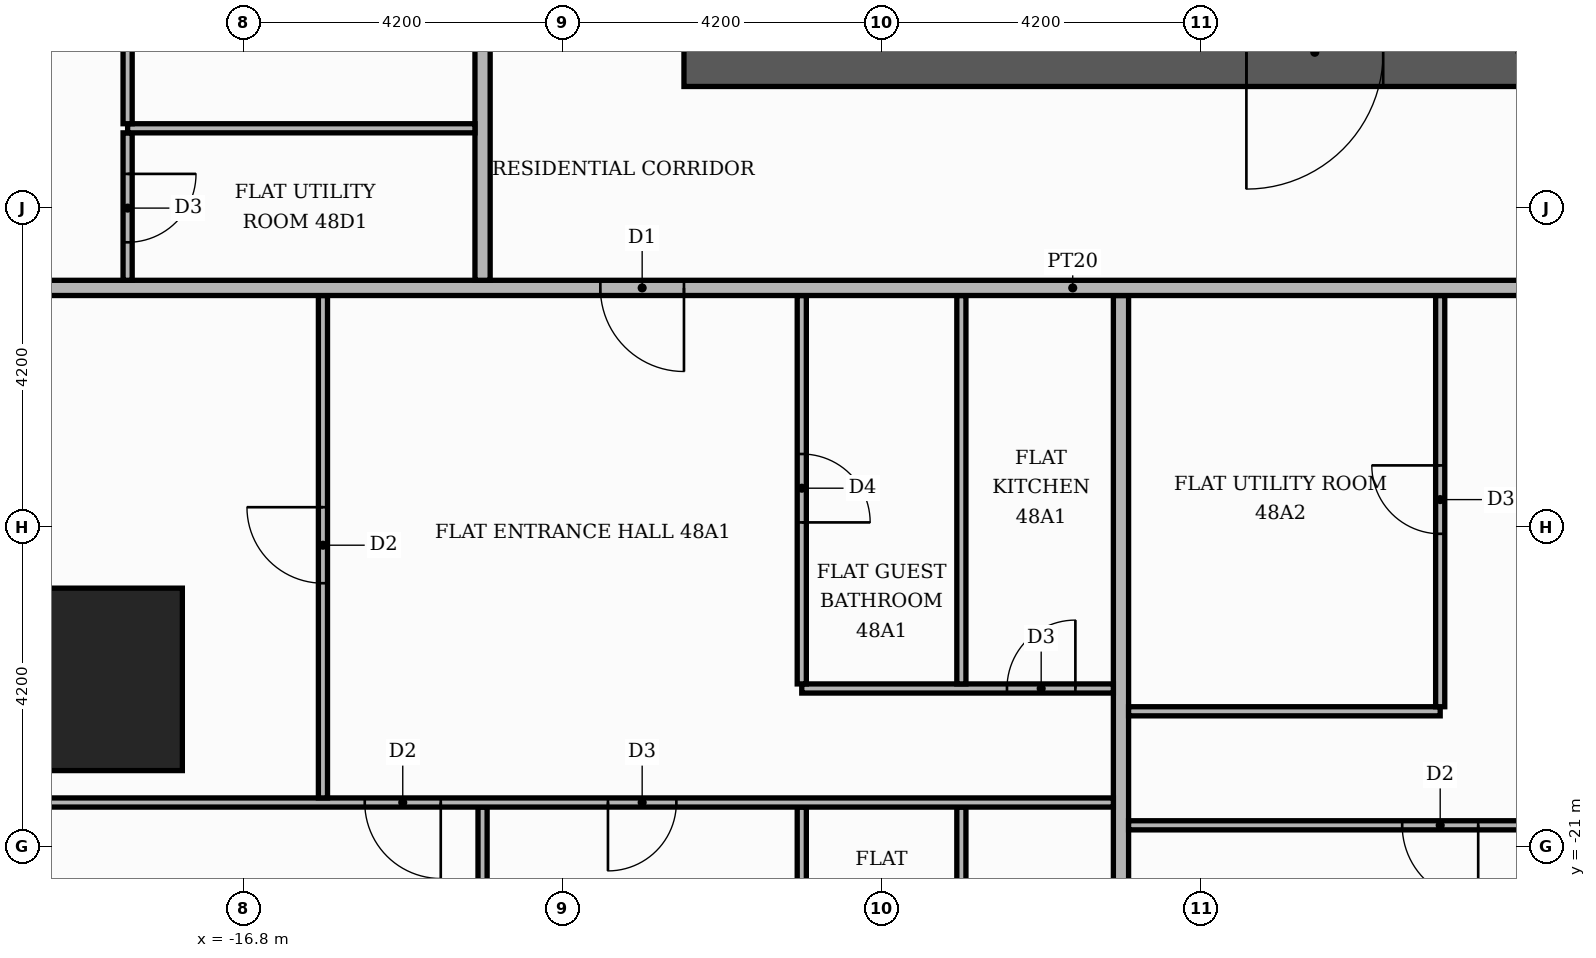
"""IFC4 building model, lengths in metres.
Left out: names, types, materials, properties, quantities, classifications, styles, units other than length and angle.
Written with IfcOpenShell. Run it as: python <this file> out.ifc"""

import sys

from ifc_helpers import new_model, si_unit, direction, frame, frame_2d, origin, origin_2d, place, context, subcontext, project, spatial, rectangle, extrude, element, fill, save


model = new_model("IFC4")
c1 = context("Model", 3, precision=1e-05, world=origin(), true_north=direction((0.0, 1.0)))
c2 = subcontext(c1, "Body", "Model", "MODEL_VIEW")
j1 = project(units=[si_unit("LENGTHUNIT", "METRE"), si_unit("PLANEANGLEUNIT", "RADIAN")], contexts=[c1])
p1 = place(None, origin())
s1 = spatial("IfcSite", under=j1, at=p1, CompositionType="ELEMENT")
p2 = place(p1, origin())
s2 = spatial("IfcBuilding", under=s1, at=p2, CompositionType="ELEMENT")
p3 = place(p2, frame((0.0, 0.0, 204.0)))
s3 = spatial("IfcBuildingStorey", under=s2, at=p3, CompositionType="ELEMENT", Elevation=204.0)
p4 = place(p3, frame((-11.0, -10.55, 0.0), z_axis=(0.0, 0.0, 1.0), x_axis=(1.0, 0.0, 0.0)))
e1 = element("IfcWall", 1, at=p4, inside=s3, PredefinedType="SHEAR", context=c2, shape_type="SweptSolid", body=[
    extrude(rectangle(XDim=22.0, YDim=0.9, at=frame_2d((11.0, 0.0))), origin(), (0.0, 0.0, 1.0), 3.48),
])
p5 = place(p4, frame((7.4, 0.0, 0.0)))
e2 = element("IfcOpeningElement", 2, at=p5, cuts=e1, PredefinedType="OPENING", context=c2, shape_type="SweptSolid", body=[
    extrude(rectangle(XDim=1.8, YDim=2.2, at=frame_2d((0.9, 1.1))), frame((0.0, 0.46, 0.0), z_axis=(0.0, -1.0, 0.0), x_axis=(1.0, 0.0, 0.0)), (0.0, 0.0, 1.0), 0.92),
])
p6 = place(p3, frame((-18.8, -18.8, 0.0), z_axis=(0.0, 0.0, 1.0), x_axis=(1.0, 0.0, 0.0)))
e3 = element("IfcColumn", 3, at=p6, inside=s3, PredefinedType="COLUMN", context=c2, shape_type="SweptSolid", body=[
    extrude(rectangle(XDim=2.4, YDim=2.4, at=origin_2d()), origin(), (0.0, 0.0, 1.0), 3.9),
])
p7 = place(p3, frame((-13.65, -25.42, 0.0), z_axis=(0.0, 0.0, 1.0), x_axis=(0.0, 1.0, 0.0)))
e4 = element("IfcWall", 4, at=p7, inside=s3, PredefinedType="PARTITIONING", context=c2, shape_type="SweptSolid", body=[
    extrude(rectangle(XDim=4.94, YDim=0.12, at=frame_2d((2.47, 0.0))), origin(), (0.0, 0.0, 1.0), 3.48),
])
p8 = place(p3, frame((-9.45, -25.42, 0.0), z_axis=(0.0, 0.0, 1.0), x_axis=(0.0, 1.0, 0.0)))
e5 = element("IfcWall", 5, at=p8, inside=s3, PredefinedType="PARTITIONING", context=c2, shape_type="SweptSolid", body=[
    extrude(rectangle(XDim=4.94, YDim=0.12, at=frame_2d((2.47, 0.0))), origin(), (0.0, 0.0, 1.0), 3.48),
])
p9 = place(p8, frame((1.9, 0.0, 0.0)))
e6 = element("IfcOpeningElement", 6, at=p9, cuts=e5, PredefinedType="OPENING", context=c2, shape_type="SweptSolid", body=[
    extrude(rectangle(XDim=0.9, YDim=2.1, at=frame_2d((0.45, 1.05))), frame((0.0, 0.07, 0.0), z_axis=(0.0, -1.0, 0.0), x_axis=(1.0, 0.0, 0.0)), (0.0, 0.0, 1.0), 0.14),
])
p10 = place(p3, frame((-7.35, -25.42, 0.0), z_axis=(0.0, 0.0, 1.0), x_axis=(0.0, 1.0, 0.0)))
e7 = element("IfcWall", 7, at=p10, inside=s3, PredefinedType="PARTITIONING", context=c2, shape_type="SweptSolid", body=[
    extrude(rectangle(XDim=4.94, YDim=0.12, at=frame_2d((2.47, 0.0))), origin(), (0.0, 0.0, 1.0), 3.48),
])
p11 = place(p10, frame((1.9, 0.0, 0.0)))
e8 = element("IfcOpeningElement", 8, at=p11, cuts=e7, PredefinedType="OPENING", context=c2, shape_type="SweptSolid", body=[
    extrude(rectangle(XDim=0.9, YDim=2.1, at=frame_2d((0.45, 1.05))), frame((0.0, 0.07, 0.0), z_axis=(0.0, -1.0, 0.0), x_axis=(1.0, 0.0, 0.0)), (0.0, 0.0, 1.0), 0.14),
])
p12 = place(p3, frame((-5.25, -25.42, 0.0), z_axis=(0.0, 0.0, 1.0), x_axis=(0.0, 1.0, 0.0)))
e9 = element("IfcWall", 9, at=p12, inside=s3, PredefinedType="PARTITIONING", context=c2, shape_type="SweptSolid", body=[
    extrude(rectangle(XDim=11.67, YDim=0.2, at=frame_2d((5.835, 0.0))), origin(), (0.0, 0.0, 1.0), 3.48),
])
p13 = place(p3, frame((-5.15, -20.72, 0.0), z_axis=(0.0, 0.0, 1.0), x_axis=(1.0, 0.0, 0.0)))
e10 = element("IfcWall", 10, at=p13, inside=s3, PredefinedType="PARTITIONING", context=c2, shape_type="SweptSolid", body=[
    extrude(rectangle(XDim=18.7, YDim=0.12, at=frame_2d((9.35, 0.0))), origin(), (0.0, 0.0, 1.0), 3.48),
])
p14 = place(p13, frame((3.6, 0.0, 0.0)))
e11 = element("IfcOpeningElement", 11, at=p14, cuts=e10, PredefinedType="OPENING", context=c2, shape_type="SweptSolid", body=[
    extrude(rectangle(XDim=1.0, YDim=2.1, at=frame_2d((0.5, 1.05))), frame((0.0, 0.07, 0.0), z_axis=(0.0, -1.0, 0.0), x_axis=(1.0, 0.0, 0.0)), (0.0, 0.0, 1.0), 0.14),
])
p15 = place(p13, frame((11.0, 0.0, 0.0)))
e12 = element("IfcOpeningElement", 12, at=p15, cuts=e10, PredefinedType="OPENING", context=c2, shape_type="SweptSolid", body=[
    extrude(rectangle(XDim=0.9, YDim=2.1, at=frame_2d((0.45, 1.05))), frame((0.0, 0.07, 0.0), z_axis=(0.0, -1.0, 0.0), x_axis=(1.0, 0.0, 0.0)), (0.0, 0.0, 1.0), 0.14),
])
p16 = place(p3, frame((-21.219, -20.42, 0.0), z_axis=(0.0, 0.0, 1.0), x_axis=(1.0, 0.0, 0.0)))
e13 = element("IfcWall", 13, at=p16, inside=s3, PredefinedType="PARTITIONING", context=c2, shape_type="SweptSolid", body=[
    extrude(rectangle(XDim=15.869, YDim=0.12, at=frame_2d((7.935, 0.0))), origin(), (0.0, 0.0, 1.0), 3.48),
])
p17 = place(p16, frame((6.019, 0.0, 0.0)))
e14 = element("IfcOpeningElement", 14, at=p17, cuts=e13, PredefinedType="OPENING", context=c2, shape_type="SweptSolid", body=[
    extrude(rectangle(XDim=1.0, YDim=2.1, at=frame_2d((0.5, 1.05))), frame((0.0, 0.07, 0.0), z_axis=(0.0, -1.0, 0.0), x_axis=(1.0, 0.0, 0.0)), (0.0, 0.0, 1.0), 0.14),
])
p18 = place(p16, frame((9.219, 0.0, 0.0)))
e15 = element("IfcOpeningElement", 15, at=p18, cuts=e13, PredefinedType="OPENING", context=c2, shape_type="SweptSolid", body=[
    extrude(rectangle(XDim=0.9, YDim=2.1, at=frame_2d((0.45, 1.05))), frame((0.0, 0.07, 0.0), z_axis=(0.0, -1.0, 0.0), x_axis=(1.0, 0.0, 0.0)), (0.0, 0.0, 1.0), 0.14),
])
p19 = place(p3, frame((-15.75, -20.36, 0.0), z_axis=(0.0, 0.0, 1.0), x_axis=(0.0, 1.0, 0.0)))
e16 = element("IfcWall", 16, at=p19, inside=s3, PredefinedType="PARTITIONING", context=c2, shape_type="SweptSolid", body=[
    extrude(rectangle(XDim=6.61, YDim=0.12, at=frame_2d((3.305, 0.0))), origin(), (0.0, 0.0, 1.0), 3.48),
])
p20 = place(p19, frame((2.825, 0.0, 0.0)))
e17 = element("IfcOpeningElement", 17, at=p20, cuts=e16, PredefinedType="OPENING", context=c2, shape_type="SweptSolid", body=[
    extrude(rectangle(XDim=1.0, YDim=2.1, at=frame_2d((0.5, 1.05))), frame((0.0, 0.07, 0.0), z_axis=(0.0, -1.0, 0.0), x_axis=(1.0, 0.0, 0.0)), (0.0, 0.0, 1.0), 0.14),
])
p21 = place(p3, frame((-5.15, -19.22, 0.0), z_axis=(0.0, 0.0, 1.0), x_axis=(1.0, 0.0, 0.0)))
e18 = element("IfcWall", 18, at=p21, inside=s3, PredefinedType="PARTITIONING", context=c2, shape_type="SweptSolid", body=[
    extrude(rectangle(XDim=4.1, YDim=0.12, at=frame_2d((2.05, 0.0))), origin(), (0.0, 0.0, 1.0), 3.48),
])
p22 = place(p3, frame((-1.05, -19.16, 0.0), z_axis=(0.0, 0.0, 1.0), x_axis=(0.0, 1.0, 0.0)))
e19 = element("IfcWall", 19, at=p22, inside=s3, PredefinedType="PARTITIONING", context=c2, shape_type="SweptSolid", body=[
    extrude(rectangle(XDim=5.41, YDim=0.12, at=frame_2d((2.705, 0.0))), origin(), (0.0, 0.0, 1.0), 3.48),
])
p23 = place(p22, frame((2.275, 0.0, 0.0)))
e20 = element("IfcOpeningElement", 20, at=p23, cuts=e19, PredefinedType="OPENING", context=c2, shape_type="SweptSolid", body=[
    extrude(rectangle(XDim=0.9, YDim=2.1, at=frame_2d((0.45, 1.05))), frame((0.0, 0.07, 0.0), z_axis=(0.0, -1.0, 0.0), x_axis=(1.0, 0.0, 0.0)), (0.0, 0.0, 1.0), 0.14),
])
p24 = place(p3, frame((-9.45, -18.92, 0.0), z_axis=(0.0, 0.0, 1.0), x_axis=(1.0, 0.0, 0.0)))
e21 = element("IfcWall", 21, at=p24, inside=s3, PredefinedType="PARTITIONING", context=c2, shape_type="SweptSolid", body=[
    extrude(rectangle(XDim=4.1, YDim=0.12, at=frame_2d((2.05, 0.0))), origin(), (0.0, 0.0, 1.0), 3.48),
])
p25 = place(p24, frame((2.7, 0.0, 0.0)))
e22 = element("IfcOpeningElement", 22, at=p25, cuts=e21, PredefinedType="OPENING", context=c2, shape_type="SweptSolid", body=[
    extrude(rectangle(XDim=0.9, YDim=2.1, at=frame_2d((0.45, 1.05))), frame((0.0, 0.07, 0.0), z_axis=(0.0, -1.0, 0.0), x_axis=(1.0, 0.0, 0.0)), (0.0, 0.0, 1.0), 0.14),
])
p26 = place(p3, frame((-9.45, -18.86, 0.0), z_axis=(0.0, 0.0, 1.0), x_axis=(0.0, 1.0, 0.0)))
e23 = element("IfcWall", 23, at=p26, inside=s3, PredefinedType="PARTITIONING", context=c2, shape_type="SweptSolid", body=[
    extrude(rectangle(XDim=5.11, YDim=0.12, at=frame_2d((2.555, 0.0))), origin(), (0.0, 0.0, 1.0), 3.48),
])
p27 = place(p26, frame((2.125, 0.0, 0.0)))
e24 = element("IfcOpeningElement", 24, at=p27, cuts=e23, PredefinedType="OPENING", context=c2, shape_type="SweptSolid", body=[
    extrude(rectangle(XDim=0.9, YDim=2.1, at=frame_2d((0.45, 1.05))), frame((0.0, 0.07, 0.0), z_axis=(0.0, -1.0, 0.0), x_axis=(1.0, 0.0, 0.0)), (0.0, 0.0, 1.0), 0.14),
])
p28 = place(p3, frame((-7.35, -18.86, 0.0), z_axis=(0.0, 0.0, 1.0), x_axis=(0.0, 1.0, 0.0)))
e25 = element("IfcWall", 25, at=p28, inside=s3, PredefinedType="PARTITIONING", context=c2, shape_type="SweptSolid", body=[
    extrude(rectangle(XDim=5.11, YDim=0.12, at=frame_2d((2.555, 0.0))), origin(), (0.0, 0.0, 1.0), 3.48),
])
p29 = place(p3, frame((-25.42, -13.65, 0.0), z_axis=(0.0, 0.0, 1.0), x_axis=(1.0, 0.0, 0.0)))
e26 = element("IfcWall", 26, at=p29, inside=s3, PredefinedType="PARTITIONING", context=c2, shape_type="SweptSolid", body=[
    extrude(rectangle(XDim=39.07, YDim=0.2, at=frame_2d((19.535, 0.0))), origin(), (0.0, 0.0, 1.0), 3.48),
])
p30 = place(p29, frame((13.32, 0.0, 0.0)))
e27 = element("IfcOpeningElement", 27, at=p30, cuts=e26, PredefinedType="OPENING", context=c2, shape_type="SweptSolid", body=[
    extrude(rectangle(XDim=1.1, YDim=2.4, at=frame_2d((0.55, 1.2))), frame((0.0, 0.11, 0.0), z_axis=(0.0, -1.0, 0.0), x_axis=(1.0, 0.0, 0.0)), (0.0, 0.0, 1.0), 0.22),
])
p31 = place(p29, frame((25.92, 0.0, 0.0)))
e28 = element("IfcOpeningElement", 28, at=p31, cuts=e26, PredefinedType="OPENING", context=c2, shape_type="SweptSolid", body=[
    extrude(rectangle(XDim=1.1, YDim=2.4, at=frame_2d((0.55, 1.2))), frame((0.0, 0.11, 0.0), z_axis=(0.0, -1.0, 0.0), x_axis=(1.0, 0.0, 0.0)), (0.0, 0.0, 1.0), 0.22),
])
p32 = place(p3, frame((-18.32, -13.55, 0.0), z_axis=(0.0, 0.0, 1.0), x_axis=(0.0, 1.0, 0.0)))
e29 = element("IfcWall", 29, at=p32, inside=s3, PredefinedType="PARTITIONING", context=c2, shape_type="SweptSolid", body=[
    extrude(rectangle(XDim=1.94, YDim=0.12, at=frame_2d((0.97, 0.0))), origin(), (0.0, 0.0, 1.0), 3.48),
])
p33 = place(p32, frame((0.5, 0.0, 0.0)))
e30 = element("IfcOpeningElement", 30, at=p33, cuts=e29, PredefinedType="OPENING", context=c2, shape_type="SweptSolid", body=[
    extrude(rectangle(XDim=0.9, YDim=2.1, at=frame_2d((0.45, 1.05))), frame((0.0, 0.07, 0.0), z_axis=(0.0, -1.0, 0.0), x_axis=(1.0, 0.0, 0.0)), (0.0, 0.0, 1.0), 0.14),
])
p34 = place(p3, frame((-13.65, -13.55, 0.0), z_axis=(0.0, 0.0, 1.0), x_axis=(0.0, 1.0, 0.0)))
e31 = element("IfcWall", 31, at=p34, inside=s3, PredefinedType="PARTITIONING", context=c2, shape_type="SweptSolid", body=[
    extrude(rectangle(XDim=27.1, YDim=0.2, at=frame_2d((13.55, 0.0))), origin(), (0.0, 0.0, 1.0), 3.48),
])
p35 = place(p34, frame((23.5, 0.0, 0.0)))
e32 = element("IfcOpeningElement", 32, at=p35, cuts=e31, PredefinedType="OPENING", context=c2, shape_type="SweptSolid", body=[
    extrude(rectangle(XDim=1.1, YDim=2.4, at=frame_2d((0.55, 1.2))), frame((0.0, 0.11, 0.0), z_axis=(0.0, -1.0, 0.0), x_axis=(1.0, 0.0, 0.0)), (0.0, 0.0, 1.0), 0.22),
])
p36 = place(p3, frame((-18.32, -11.55, 0.0), z_axis=(0.0, 0.0, 1.0), x_axis=(1.0, 0.0, 0.0)))
e33 = element("IfcWall", 33, at=p36, inside=s3, PredefinedType="PARTITIONING", context=c2, shape_type="SweptSolid", body=[
    extrude(rectangle(XDim=4.57, YDim=0.12, at=frame_2d((2.285, 0.0))), origin(), (0.0, 0.0, 1.0), 3.48),
])
p37 = place(p3, frame((-18.32, -11.49, 0.0), z_axis=(0.0, 0.0, 1.0), x_axis=(0.0, 1.0, 0.0)))
e34 = element("IfcWall", 34, at=p37, inside=s3, PredefinedType="PARTITIONING", context=c2, shape_type="SweptSolid", body=[
    extrude(rectangle(XDim=4.23, YDim=0.12, at=frame_2d((2.115, 0.0))), origin(), (0.0, 0.0, 1.0), 3.48),
])
p38 = place(p37, frame((1.665, 0.0, 0.0)))
e35 = element("IfcOpeningElement", 35, at=p38, cuts=e34, PredefinedType="OPENING", context=c2, shape_type="SweptSolid", body=[
    extrude(rectangle(XDim=0.9, YDim=2.1, at=frame_2d((0.45, 1.05))), frame((0.0, 0.07, 0.0), z_axis=(0.0, -1.0, 0.0), x_axis=(1.0, 0.0, 0.0)), (0.0, 0.0, 1.0), 0.14),
])
p39 = place(p5, frame((1.8, 0.0, 0.0), z_axis=(0.0, 0.0, 1.0), x_axis=(-1.0, 0.0, 0.0)))
e36 = element("IfcDoor", 36, at=p39, inside=s3, OperationType="DOUBLE_DOOR_SINGLE_SWING", PredefinedType="DOOR", context=c2, shape_type="SweptSolid", body=[
    extrude(rectangle(XDim=1.8, YDim=2.2, at=frame_2d((0.9, 1.1))), frame((0.0, 0.025, 0.0), z_axis=(0.0, -1.0, 0.0), x_axis=(1.0, 0.0, 0.0)), (0.0, 0.0, 1.0), 0.05),
])
fill(e2, e36)
p40 = place(p30, frame((1.1, 0.0, 0.0), z_axis=(0.0, 0.0, 1.0), x_axis=(-1.0, 0.0, 0.0)))
e37 = element("IfcDoor", 37, at=p40, inside=s3, OperationType="SINGLE_SWING_RIGHT", PredefinedType="DOOR", context=c2, shape_type="SweptSolid", body=[
    extrude(rectangle(XDim=1.1, YDim=2.4, at=frame_2d((0.55, 1.2))), frame((0.0, 0.025, 0.0), z_axis=(0.0, -1.0, 0.0), x_axis=(1.0, 0.0, 0.0)), (0.0, 0.0, 1.0), 0.05),
])
fill(e27, e37)
p41 = place(p20, origin())
e38 = element("IfcDoor", 38, at=p41, inside=s3, OperationType="SINGLE_SWING_RIGHT", PredefinedType="DOOR", context=c2, shape_type="SweptSolid", body=[
    extrude(rectangle(XDim=1.0, YDim=2.1, at=frame_2d((0.5, 1.05))), frame((0.0, 0.025, 0.0), z_axis=(0.0, -1.0, 0.0), x_axis=(1.0, 0.0, 0.0)), (0.0, 0.0, 1.0), 0.05),
])
fill(e17, e38)
p42 = place(p27, frame((0.9, 0.0, 0.0), z_axis=(0.0, 0.0, 1.0), x_axis=(-1.0, 0.0, 0.0)))
e39 = element("IfcDoor", 39, at=p42, inside=s3, OperationType="SINGLE_SWING_LEFT", PredefinedType="DOOR", context=c2, shape_type="SweptSolid", body=[
    extrude(rectangle(XDim=0.9, YDim=2.1, at=frame_2d((0.45, 1.05))), frame((0.0, 0.025, 0.0), z_axis=(0.0, -1.0, 0.0), x_axis=(1.0, 0.0, 0.0)), (0.0, 0.0, 1.0), 0.05),
])
fill(e24, e39)
p43 = place(p25, origin())
e40 = element("IfcDoor", 40, at=p43, inside=s3, OperationType="SINGLE_SWING_RIGHT", PredefinedType="DOOR", context=c2, shape_type="SweptSolid", body=[
    extrude(rectangle(XDim=0.9, YDim=2.1, at=frame_2d((0.45, 1.05))), frame((0.0, 0.025, 0.0), z_axis=(0.0, -1.0, 0.0), x_axis=(1.0, 0.0, 0.0)), (0.0, 0.0, 1.0), 0.05),
])
fill(e22, e40)
p44 = place(p17, frame((1.0, 0.0, 0.0), z_axis=(0.0, 0.0, 1.0), x_axis=(-1.0, 0.0, 0.0)))
e41 = element("IfcDoor", 41, at=p44, inside=s3, OperationType="SINGLE_SWING_RIGHT", PredefinedType="DOOR", context=c2, shape_type="SweptSolid", body=[
    extrude(rectangle(XDim=1.0, YDim=2.1, at=frame_2d((0.5, 1.05))), frame((0.0, 0.025, 0.0), z_axis=(0.0, -1.0, 0.0), x_axis=(1.0, 0.0, 0.0)), (0.0, 0.0, 1.0), 0.05),
])
fill(e14, e41)
p45 = place(p18, frame((0.9, 0.0, 0.0), z_axis=(0.0, 0.0, 1.0), x_axis=(-1.0, 0.0, 0.0)))
e42 = element("IfcDoor", 42, at=p45, inside=s3, OperationType="SINGLE_SWING_LEFT", PredefinedType="DOOR", context=c2, shape_type="SweptSolid", body=[
    extrude(rectangle(XDim=0.9, YDim=2.1, at=frame_2d((0.45, 1.05))), frame((0.0, 0.025, 0.0), z_axis=(0.0, -1.0, 0.0), x_axis=(1.0, 0.0, 0.0)), (0.0, 0.0, 1.0), 0.05),
])
fill(e15, e42)
p46 = place(p23, origin())
e43 = element("IfcDoor", 43, at=p46, inside=s3, OperationType="SINGLE_SWING_RIGHT", PredefinedType="DOOR", context=c2, shape_type="SweptSolid", body=[
    extrude(rectangle(XDim=0.9, YDim=2.1, at=frame_2d((0.45, 1.05))), frame((0.0, 0.025, 0.0), z_axis=(0.0, -1.0, 0.0), x_axis=(1.0, 0.0, 0.0)), (0.0, 0.0, 1.0), 0.05),
])
fill(e20, e43)
p47 = place(p14, frame((1.0, 0.0, 0.0), z_axis=(0.0, 0.0, 1.0), x_axis=(-1.0, 0.0, 0.0)))
e44 = element("IfcDoor", 44, at=p47, inside=s3, OperationType="SINGLE_SWING_RIGHT", PredefinedType="DOOR", context=c2, shape_type="SweptSolid", body=[
    extrude(rectangle(XDim=1.0, YDim=2.1, at=frame_2d((0.5, 1.05))), frame((0.0, 0.025, 0.0), z_axis=(0.0, -1.0, 0.0), x_axis=(1.0, 0.0, 0.0)), (0.0, 0.0, 1.0), 0.05),
])
fill(e11, e44)
p48 = place(p33, frame((0.9, 0.0, 0.0), z_axis=(0.0, 0.0, 1.0), x_axis=(-1.0, 0.0, 0.0)))
e45 = element("IfcDoor", 45, at=p48, inside=s3, OperationType="SINGLE_SWING_RIGHT", PredefinedType="DOOR", context=c2, shape_type="SweptSolid", body=[
    extrude(rectangle(XDim=0.9, YDim=2.1, at=frame_2d((0.45, 1.05))), frame((0.0, 0.025, 0.0), z_axis=(0.0, -1.0, 0.0), x_axis=(1.0, 0.0, 0.0)), (0.0, 0.0, 1.0), 0.05),
])
fill(e30, e45)
save(model, sys.argv[1])
